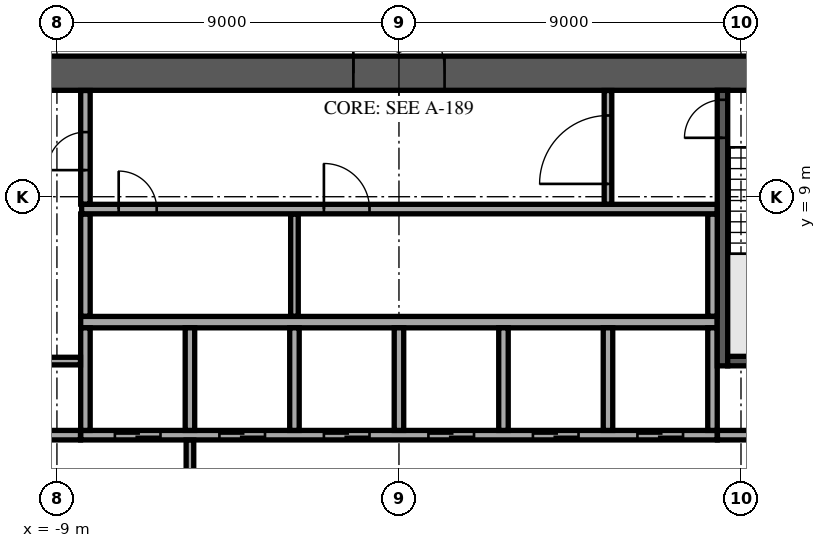
"""IFC4 building model, lengths in metres.
Left out: names, types, materials, properties, quantities, classifications, styles, units other than length and angle.
Written with IfcOpenShell. Run it as: python <this file> out.ifc"""

import sys

from ifc_helpers import new_model, si_unit, direction, frame, frame_2d, origin, place, context, subcontext, project, spatial, rectangle, extrude, element, fill, save


model = new_model("IFC4")
c1 = context("Model", 3, precision=1e-05, world=origin(), true_north=direction((0.0, 1.0)))
c2 = subcontext(c1, "Body", "Model", "MODEL_VIEW")
j1 = project(units=[si_unit("LENGTHUNIT", "METRE"), si_unit("PLANEANGLEUNIT", "RADIAN")], contexts=[c1])
p1 = place(None, origin())
s1 = spatial("IfcSite", under=j1, at=p1, CompositionType="ELEMENT")
p2 = place(p1, origin())
s2 = spatial("IfcBuilding", under=s1, at=p2, CompositionType="ELEMENT")
p3 = place(p2, frame((0.0, 0.0, 193.3)))
s3 = spatial("IfcBuildingStorey", under=s2, at=p3, CompositionType="ELEMENT", Elevation=193.3)
p4 = place(p3, frame((-12.7, 12.25, 0.0), z_axis=(0.0, 0.0, 1.0), x_axis=(1.0, 0.0, 0.0)))
e1 = element("IfcWall", 1, at=p4, inside=s3, PredefinedType="SHEAR", context=c2, shape_type="SweptSolid", body=[
    extrude(rectangle(XDim=25.4, YDim=0.9, at=frame_2d((12.7, 0.0))), origin(), (0.0, 0.0, 1.0), 3.62),
])
p5 = place(p4, frame((11.5, 0.0, 0.0)))
e2 = element("IfcOpeningElement", 2, at=p5, cuts=e1, PredefinedType="OPENING", context=c2, shape_type="SweptSolid", body=[
    extrude(rectangle(XDim=2.4, YDim=2.4, at=frame_2d((1.2, 1.2))), frame((0.0, 0.46, 0.0), z_axis=(0.0, -1.0, 0.0), x_axis=(1.0, 0.0, 0.0)), (0.0, 0.0, 1.0), 0.92),
])
p6 = place(p4, frame((22.325, 0.0, 0.0)))
e3 = element("IfcOpeningElement", 3, at=p6, cuts=e1, PredefinedType="OPENING", context=c2, shape_type="SweptSolid", body=[
    extrude(rectangle(XDim=1.2, YDim=2.1, at=frame_2d((0.6, 1.05))), frame((0.0, 0.46, 0.0), z_axis=(0.0, -1.0, 0.0), x_axis=(1.0, 0.0, 0.0)), (0.0, 0.0, 1.0), 0.92),
])
p7 = place(p4, frame((1.3, 0.0, 0.0)))
e4 = element("IfcOpeningElement", 4, at=p7, cuts=e1, PredefinedType="OPENING", context=c2, shape_type="SweptSolid", body=[
    extrude(rectangle(XDim=1.0, YDim=2.1, at=frame_2d((0.5, 1.05))), frame((0.0, 0.46, 0.0), z_axis=(0.0, -1.0, 0.0), x_axis=(1.0, 0.0, 0.0)), (0.0, 0.0, 1.0), 0.92),
])
p8 = place(p3, frame((-8.375, 5.7, 0.0), z_axis=(0.0, 0.0, 1.0), x_axis=(1.0, 0.0, 0.0)))
e5 = element("IfcWall", 5, at=p8, inside=s3, PredefinedType="SOLIDWALL", context=c2, shape_type="SweptSolid", body=[
    extrude(rectangle(XDim=16.75, YDim=0.3, at=frame_2d((8.375, 0.0))), origin(), (0.0, 0.0, 1.0), 3.62),
])
p9 = place(p3, frame((-8.375, 2.725, 0.0), z_axis=(0.0, 0.0, 1.0), x_axis=(1.0, 0.0, 0.0)))
e6 = element("IfcWall", 6, at=p9, inside=s3, PredefinedType="SOLIDWALL", context=c2, shape_type="SweptSolid", body=[
    extrude(rectangle(XDim=16.75, YDim=0.25, at=frame_2d((8.375, 0.0))), origin(), (0.0, 0.0, 1.0), 3.62),
])
p10 = place(p9, frame((0.9, 0.0, 0.0)))
e7 = element("IfcOpeningElement", 7, at=p10, cuts=e6, PredefinedType="OPENING", context=c2, shape_type="SweptSolid", body=[
    extrude(rectangle(XDim=1.2, YDim=2.1, at=frame_2d((0.6, 1.05))), frame((0.0, 0.135, 0.0), z_axis=(0.0, -1.0, 0.0), x_axis=(1.0, 0.0, 0.0)), (0.0, 0.0, 1.0), 0.27),
])
p11 = place(p9, frame((3.65, 0.0, 0.0)))
e8 = element("IfcOpeningElement", 8, at=p11, cuts=e6, PredefinedType="OPENING", context=c2, shape_type="SweptSolid", body=[
    extrude(rectangle(XDim=1.2, YDim=2.1, at=frame_2d((0.6, 1.05))), frame((0.0, 0.135, 0.0), z_axis=(0.0, -1.0, 0.0), x_axis=(1.0, 0.0, 0.0)), (0.0, 0.0, 1.0), 0.27),
])
p12 = place(p9, frame((6.4, 0.0, 0.0)))
e9 = element("IfcOpeningElement", 9, at=p12, cuts=e6, PredefinedType="OPENING", context=c2, shape_type="SweptSolid", body=[
    extrude(rectangle(XDim=1.2, YDim=2.1, at=frame_2d((0.6, 1.05))), frame((0.0, 0.135, 0.0), z_axis=(0.0, -1.0, 0.0), x_axis=(1.0, 0.0, 0.0)), (0.0, 0.0, 1.0), 0.27),
])
p13 = place(p9, frame((9.15, 0.0, 0.0)))
e10 = element("IfcOpeningElement", 10, at=p13, cuts=e6, PredefinedType="OPENING", context=c2, shape_type="SweptSolid", body=[
    extrude(rectangle(XDim=1.2, YDim=2.1, at=frame_2d((0.6, 1.05))), frame((0.0, 0.135, 0.0), z_axis=(0.0, -1.0, 0.0), x_axis=(1.0, 0.0, 0.0)), (0.0, 0.0, 1.0), 0.27),
])
p14 = place(p9, frame((11.9, 0.0, 0.0)))
e11 = element("IfcOpeningElement", 11, at=p14, cuts=e6, PredefinedType="OPENING", context=c2, shape_type="SweptSolid", body=[
    extrude(rectangle(XDim=1.2, YDim=2.1, at=frame_2d((0.6, 1.05))), frame((0.0, 0.135, 0.0), z_axis=(0.0, -1.0, 0.0), x_axis=(1.0, 0.0, 0.0)), (0.0, 0.0, 1.0), 0.27),
])
p15 = place(p9, frame((14.65, 0.0, 0.0)))
e12 = element("IfcOpeningElement", 12, at=p15, cuts=e6, PredefinedType="OPENING", context=c2, shape_type="SweptSolid", body=[
    extrude(rectangle(XDim=1.2, YDim=2.1, at=frame_2d((0.6, 1.05))), frame((0.0, 0.135, 0.0), z_axis=(0.0, -1.0, 0.0), x_axis=(1.0, 0.0, 0.0)), (0.0, 0.0, 1.0), 0.27),
])
for number, where, z_axis, x_axis in (
    (13, (-8.25, 2.85, 0.0), (0.0, 0.0, 1.0), (0.0, 1.0, 0.0)),
    (14, (-5.5, 2.85, 0.0), (0.0, 0.0, 1.0), (0.0, 1.0, 0.0)),
    (15, (-2.75, 2.85, 0.0), (0.0, 0.0, 1.0), (0.0, 1.0, 0.0)),
    (16, (0.0, 2.85, 0.0), (0.0, 0.0, 1.0), (0.0, 1.0, 0.0)),
    (17, (2.75, 2.85, 0.0), (0.0, 0.0, 1.0), (0.0, 1.0, 0.0)),
    (18, (5.5, 2.85, 0.0), (0.0, 0.0, 1.0), (0.0, 1.0, 0.0)),
    (19, (8.25, 2.85, 0.0), (0.0, 0.0, 1.0), (0.0, 1.0, 0.0)),
):
    element("IfcWall", number, at=place(p3, frame(where, z_axis=z_axis, x_axis=x_axis)), inside=s3, PredefinedType="SOLIDWALL", context=c2, shape_type="SweptSolid", body=[
        extrude(rectangle(XDim=2.7, YDim=0.25, at=frame_2d((1.35, 0.0))), origin(), (0.0, 0.0, 1.0), 3.62),
    ])
p16 = place(p3, frame((8.512, 4.55, 0.0), z_axis=(0.0, 0.0, 1.0), x_axis=(0.0, 1.0, 0.0)))
e20 = element("IfcWall", 20, at=p16, inside=s3, PredefinedType="SOLIDWALL", context=c2, shape_type="SweptSolid", body=[
    extrude(rectangle(XDim=7.25, YDim=0.275, at=frame_2d((3.625, 0.0))), origin(), (0.0, 0.0, 1.0), 3.62),
])
p17 = place(p16, frame((6.0, 0.0, 0.0)))
e21 = element("IfcOpeningElement", 21, at=p17, cuts=e20, PredefinedType="OPENING", context=c2, shape_type="SweptSolid", body=[
    extrude(rectangle(XDim=1.0, YDim=2.1, at=frame_2d((0.5, 1.05))), frame((0.0, 0.147, 0.0), z_axis=(0.0, -1.0, 0.0), x_axis=(1.0, 0.0, 0.0)), (0.0, 0.0, 1.0), 0.295),
])
p18 = place(p3, frame((8.65, 4.675, 0.0), z_axis=(0.0, 0.0, 1.0), x_axis=(1.0, 0.0, 0.0)))
e22 = element("IfcWall", 22, at=p18, inside=s3, PredefinedType="SOLIDWALL", context=c2, shape_type="SweptSolid", body=[
    extrude(rectangle(XDim=3.15, YDim=0.25, at=frame_2d((1.575, 0.0))), origin(), (0.0, 0.0, 1.0), 3.62),
])
p19 = place(p3, frame((-5.5, -2.595, 0.0), z_axis=(0.0, 0.0, 1.0), x_axis=(0.0, 1.0, 0.0)))
e23 = element("IfcWall", 23, at=p19, inside=s3, PredefinedType="PARTITIONING", context=c2, shape_type="SweptSolid", body=[
    extrude(rectangle(XDim=5.19, YDim=0.2, at=frame_2d((2.595, 0.0))), origin(), (0.0, 0.0, 1.0), 3.62),
])
p20 = place(p19, frame((1.395, 0.0, 0.0)))
e24 = element("IfcOpeningElement", 24, at=p20, cuts=e23, PredefinedType="OPENING", context=c2, shape_type="SweptSolid", body=[
    extrude(rectangle(XDim=2.4, YDim=2.4, at=frame_2d((1.2, 1.2))), frame((0.0, 0.11, 0.0), z_axis=(0.0, -1.0, 0.0), x_axis=(1.0, 0.0, 0.0)), (0.0, 0.0, 1.0), 0.22),
])
p21 = place(p3, frame((-11.795, 2.725, 0.0), z_axis=(0.0, 0.0, 1.0), x_axis=(1.0, 0.0, 0.0)))
e25 = element("IfcWall", 25, at=p21, inside=s3, PredefinedType="PARTITIONING", context=c2, shape_type="SweptSolid", body=[
    extrude(rectangle(XDim=3.415, YDim=0.25, at=frame_2d((1.708, 0.0))), origin(), (0.0, 0.0, 1.0), 3.62),
])
p22 = place(p21, frame((1.345, 0.0, 0.0)))
e26 = element("IfcOpeningElement", 26, at=p22, cuts=e25, PredefinedType="OPENING", context=c2, shape_type="SweptSolid", body=[
    extrude(rectangle(XDim=0.9, YDim=2.1, at=frame_2d((0.45, 1.05))), frame((0.0, 0.135, 0.0), z_axis=(0.0, -1.0, 0.0), x_axis=(1.0, 0.0, 0.0)), (0.0, 0.0, 1.0), 0.27),
])
p23 = place(p3, frame((8.38, 2.725, 0.0), z_axis=(0.0, 0.0, 1.0), x_axis=(1.0, 0.0, 0.0)))
e27 = element("IfcWall", 27, at=p23, inside=s3, PredefinedType="PARTITIONING", context=c2, shape_type="SweptSolid", body=[
    extrude(rectangle(XDim=3.415, YDim=0.25, at=frame_2d((1.708, 0.0))), origin(), (0.0, 0.0, 1.0), 3.62),
])
p24 = place(p23, frame((1.17, 0.0, 0.0)))
e28 = element("IfcOpeningElement", 28, at=p24, cuts=e27, PredefinedType="OPENING", context=c2, shape_type="SweptSolid", body=[
    extrude(rectangle(XDim=0.9, YDim=2.1, at=frame_2d((0.45, 1.05))), frame((0.0, 0.135, 0.0), z_axis=(0.0, -1.0, 0.0), x_axis=(1.0, 0.0, 0.0)), (0.0, 0.0, 1.0), 0.27),
])
p25 = place(p3, frame((-11.795, 4.675, 0.0), z_axis=(0.0, 0.0, 1.0), x_axis=(1.0, 0.0, 0.0)))
e29 = element("IfcWall", 29, at=p25, inside=s3, PredefinedType="PARTITIONING", context=c2, shape_type="SweptSolid", body=[
    extrude(rectangle(XDim=3.415, YDim=0.2, at=frame_2d((1.708, 0.0))), origin(), (0.0, 0.0, 1.0), 3.62),
])
p26 = place(p3, frame((-8.25, 5.855, 0.0), z_axis=(0.0, 0.0, 1.0), x_axis=(0.0, 1.0, 0.0)))
e30 = element("IfcWall", 30, at=p26, inside=s3, PredefinedType="PARTITIONING", context=c2, shape_type="SweptSolid", body=[
    extrude(rectangle(XDim=2.69, YDim=0.25, at=frame_2d((1.345, 0.0))), origin(), (0.0, 0.0, 1.0), 3.62),
])
p27 = place(p3, frame((-2.75, 5.855, 0.0), z_axis=(0.0, 0.0, 1.0), x_axis=(0.0, 1.0, 0.0)))
e31 = element("IfcWall", 31, at=p27, inside=s3, PredefinedType="PARTITIONING", context=c2, shape_type="SweptSolid", body=[
    extrude(rectangle(XDim=2.69, YDim=0.2, at=frame_2d((1.345, 0.0))), origin(), (0.0, 0.0, 1.0), 3.62),
])
p28 = place(p3, frame((8.25, 5.855, 0.0), z_axis=(0.0, 0.0, 1.0), x_axis=(0.0, 1.0, 0.0)))
e32 = element("IfcWall", 32, at=p28, inside=s3, PredefinedType="PARTITIONING", context=c2, shape_type="SweptSolid", body=[
    extrude(rectangle(XDim=2.69, YDim=0.25, at=frame_2d((1.345, 0.0))), origin(), (0.0, 0.0, 1.0), 3.62),
])
p29 = place(p3, frame((-8.35, 8.675, 0.0), z_axis=(0.0, 0.0, 1.0), x_axis=(1.0, 0.0, 0.0)))
e33 = element("IfcWall", 33, at=p29, inside=s3, PredefinedType="PARTITIONING", context=c2, shape_type="SweptSolid", body=[
    extrude(rectangle(XDim=16.72, YDim=0.25, at=frame_2d((8.36, 0.0))), origin(), (0.0, 0.0, 1.0), 3.62),
])
p30 = place(p29, frame((0.975, 0.0, 0.0)))
e34 = element("IfcOpeningElement", 34, at=p30, cuts=e33, PredefinedType="OPENING", context=c2, shape_type="SweptSolid", body=[
    extrude(rectangle(XDim=1.0, YDim=2.1, at=frame_2d((0.5, 1.05))), frame((0.0, 0.135, 0.0), z_axis=(0.0, -1.0, 0.0), x_axis=(1.0, 0.0, 0.0)), (0.0, 0.0, 1.0), 0.27),
])
p31 = place(p29, frame((6.375, 0.0, 0.0)))
e35 = element("IfcOpeningElement", 35, at=p31, cuts=e33, PredefinedType="OPENING", context=c2, shape_type="SweptSolid", body=[
    extrude(rectangle(XDim=1.2, YDim=2.1, at=frame_2d((0.6, 1.05))), frame((0.0, 0.135, 0.0), z_axis=(0.0, -1.0, 0.0), x_axis=(1.0, 0.0, 0.0)), (0.0, 0.0, 1.0), 0.27),
])
p32 = place(p3, frame((-8.25, 8.805, 0.0), z_axis=(0.0, 0.0, 1.0), x_axis=(0.0, 1.0, 0.0)))
e36 = element("IfcWall", 36, at=p32, inside=s3, PredefinedType="PARTITIONING", context=c2, shape_type="SweptSolid", body=[
    extrude(rectangle(XDim=2.99, YDim=0.25, at=frame_2d((1.495, 0.0))), origin(), (0.0, 0.0, 1.0), 3.62),
])
p33 = place(p32, frame((0.895, 0.0, 0.0)))
e37 = element("IfcOpeningElement", 37, at=p33, cuts=e36, PredefinedType="OPENING", context=c2, shape_type="SweptSolid", body=[
    extrude(rectangle(XDim=1.0, YDim=2.1, at=frame_2d((0.5, 1.05))), frame((0.0, 0.135, 0.0), z_axis=(0.0, -1.0, 0.0), x_axis=(1.0, 0.0, 0.0)), (0.0, 0.0, 1.0), 0.27),
])
p34 = place(p3, frame((5.5, 8.805, 0.0), z_axis=(0.0, 0.0, 1.0), x_axis=(0.0, 1.0, 0.0)))
e38 = element("IfcWall", 38, at=p34, inside=s3, PredefinedType="PARTITIONING", context=c2, shape_type="SweptSolid", body=[
    extrude(rectangle(XDim=2.99, YDim=0.2, at=frame_2d((1.495, 0.0))), origin(), (0.0, 0.0, 1.0), 3.62),
])
p35 = place(p34, frame((0.532, 0.0, 0.0)))
e39 = element("IfcOpeningElement", 39, at=p35, cuts=e38, PredefinedType="OPENING", context=c2, shape_type="SweptSolid", body=[
    extrude(rectangle(XDim=1.8, YDim=2.1, at=frame_2d((0.9, 1.05))), frame((0.0, 0.11, 0.0), z_axis=(0.0, -1.0, 0.0), x_axis=(1.0, 0.0, 0.0)), (0.0, 0.0, 1.0), 0.22),
])
p36 = place(p3, frame((2.286, 34.715, 0.0), z_axis=(0.0, 0.0, 1.0), x_axis=(-0.754708272811, -0.656060532993, 0.0)))
e40 = element("IfcWall", 40, at=p36, inside=s3, PredefinedType="STANDARD", context=c2, shape_type="SweptSolid", body=[
    extrude(rectangle(XDim=49.0, YDim=0.6, at=frame_2d((24.5, 0.0))), origin(), (0.0, 0.0, 1.0), 3.62),
])
p37 = place(p36, frame((1.227, 0.0, 0.9)))
e41 = element("IfcOpeningElement", 41, at=p37, cuts=e40, PredefinedType="OPENING", context=c2, shape_type="SweptSolid", body=[
    extrude(rectangle(XDim=2.0, YDim=2.1, at=frame_2d((1.0, 1.05))), frame((0.0, 0.31, 0.0), z_axis=(0.0, -1.0, 0.0), x_axis=(1.0, 0.0, 0.0)), (0.0, 0.0, 1.0), 0.62),
])
p38 = place(p36, frame((5.682, 0.0, 0.9)))
e42 = element("IfcOpeningElement", 42, at=p38, cuts=e40, PredefinedType="OPENING", context=c2, shape_type="SweptSolid", body=[
    extrude(rectangle(XDim=2.0, YDim=2.1, at=frame_2d((1.0, 1.05))), frame((0.0, 0.31, 0.0), z_axis=(0.0, -1.0, 0.0), x_axis=(1.0, 0.0, 0.0)), (0.0, 0.0, 1.0), 0.62),
])
p39 = place(p36, frame((10.136, 0.0, 0.9)))
e43 = element("IfcOpeningElement", 43, at=p39, cuts=e40, PredefinedType="OPENING", context=c2, shape_type="SweptSolid", body=[
    extrude(rectangle(XDim=2.0, YDim=2.1, at=frame_2d((1.0, 1.05))), frame((0.0, 0.31, 0.0), z_axis=(0.0, -1.0, 0.0), x_axis=(1.0, 0.0, 0.0)), (0.0, 0.0, 1.0), 0.62),
])
p40 = place(p36, frame((14.591, 0.0, 0.9)))
e44 = element("IfcOpeningElement", 44, at=p40, cuts=e40, PredefinedType="OPENING", context=c2, shape_type="SweptSolid", body=[
    extrude(rectangle(XDim=2.0, YDim=2.1, at=frame_2d((1.0, 1.05))), frame((0.0, 0.31, 0.0), z_axis=(0.0, -1.0, 0.0), x_axis=(1.0, 0.0, 0.0)), (0.0, 0.0, 1.0), 0.62),
])
p41 = place(p36, frame((19.045, 0.0, 0.9)))
e45 = element("IfcOpeningElement", 45, at=p41, cuts=e40, PredefinedType="OPENING", context=c2, shape_type="SweptSolid", body=[
    extrude(rectangle(XDim=2.0, YDim=2.1, at=frame_2d((1.0, 1.05))), frame((0.0, 0.31, 0.0), z_axis=(0.0, -1.0, 0.0), x_axis=(1.0, 0.0, 0.0)), (0.0, 0.0, 1.0), 0.62),
])
p42 = place(p36, frame((23.5, 0.0, 0.9)))
e46 = element("IfcOpeningElement", 46, at=p42, cuts=e40, PredefinedType="OPENING", context=c2, shape_type="SweptSolid", body=[
    extrude(rectangle(XDim=2.0, YDim=2.1, at=frame_2d((1.0, 1.05))), frame((0.0, 0.31, 0.0), z_axis=(0.0, -1.0, 0.0), x_axis=(1.0, 0.0, 0.0)), (0.0, 0.0, 1.0), 0.62),
])
p43 = place(p36, frame((27.955, 0.0, 0.9)))
e47 = element("IfcOpeningElement", 47, at=p43, cuts=e40, PredefinedType="OPENING", context=c2, shape_type="SweptSolid", body=[
    extrude(rectangle(XDim=2.0, YDim=2.1, at=frame_2d((1.0, 1.05))), frame((0.0, 0.31, 0.0), z_axis=(0.0, -1.0, 0.0), x_axis=(1.0, 0.0, 0.0)), (0.0, 0.0, 1.0), 0.62),
])
p44 = place(p36, frame((32.409, 0.0, 0.9)))
e48 = element("IfcOpeningElement", 48, at=p44, cuts=e40, PredefinedType="OPENING", context=c2, shape_type="SweptSolid", body=[
    extrude(rectangle(XDim=2.0, YDim=2.1, at=frame_2d((1.0, 1.05))), frame((0.0, 0.31, 0.0), z_axis=(0.0, -1.0, 0.0), x_axis=(1.0, 0.0, 0.0)), (0.0, 0.0, 1.0), 0.62),
])
p45 = place(p36, frame((36.864, 0.0, 0.9)))
e49 = element("IfcOpeningElement", 49, at=p45, cuts=e40, PredefinedType="OPENING", context=c2, shape_type="SweptSolid", body=[
    extrude(rectangle(XDim=2.0, YDim=2.1, at=frame_2d((1.0, 1.05))), frame((0.0, 0.31, 0.0), z_axis=(0.0, -1.0, 0.0), x_axis=(1.0, 0.0, 0.0)), (0.0, 0.0, 1.0), 0.62),
])
p46 = place(p36, frame((41.318, 0.0, 0.9)))
e50 = element("IfcOpeningElement", 50, at=p46, cuts=e40, PredefinedType="OPENING", context=c2, shape_type="SweptSolid", body=[
    extrude(rectangle(XDim=2.0, YDim=2.1, at=frame_2d((1.0, 1.05))), frame((0.0, 0.31, 0.0), z_axis=(0.0, -1.0, 0.0), x_axis=(1.0, 0.0, 0.0)), (0.0, 0.0, 1.0), 0.62),
])
p47 = place(p36, frame((45.773, 0.0, 0.9)))
e51 = element("IfcOpeningElement", 51, at=p47, cuts=e40, PredefinedType="OPENING", context=c2, shape_type="SweptSolid", body=[
    extrude(rectangle(XDim=2.0, YDim=2.1, at=frame_2d((1.0, 1.05))), frame((0.0, 0.31, 0.0), z_axis=(0.0, -1.0, 0.0), x_axis=(1.0, 0.0, 0.0)), (0.0, 0.0, 1.0), 0.62),
])
p48 = place(p3, frame((-26.208, 2.616, 0.0), z_axis=(0.0, 0.0, 1.0), x_axis=(0.754710701231, 0.656057739416, 0.0)))
e52 = element("IfcWall", 52, at=p48, inside=s3, PredefinedType="PARTITIONING", context=c2, shape_type="SweptSolid", body=[
    extrude(rectangle(XDim=36.126, YDim=0.15, at=frame_2d((18.063, 0.0))), origin(), (0.0, 0.0, 1.0), 3.17),
])
p49 = place(p48, frame((2.551, 0.0, 0.0)))
e53 = element("IfcOpeningElement", 53, at=p49, cuts=e52, PredefinedType="OPENING", context=c2, shape_type="SweptSolid", body=[
    extrude(rectangle(XDim=1.0, YDim=2.1, at=frame_2d((0.5, 1.05))), frame((0.0, 0.085, 0.0), z_axis=(0.0, -1.0, 0.0), x_axis=(1.0, 0.0, 0.0)), (0.0, 0.0, 1.0), 0.17),
])
p50 = place(p48, frame((15.362, 0.0, 0.0)))
e54 = element("IfcOpeningElement", 54, at=p50, cuts=e52, PredefinedType="OPENING", context=c2, shape_type="SweptSolid", body=[
    extrude(rectangle(XDim=1.0, YDim=2.1, at=frame_2d((0.5, 1.05))), frame((0.0, 0.085, 0.0), z_axis=(0.0, -1.0, 0.0), x_axis=(1.0, 0.0, 0.0)), (0.0, 0.0, 1.0), 0.17),
])
p51 = place(p48, frame((25.542, 0.0, 0.0)))
e55 = element("IfcOpeningElement", 55, at=p51, cuts=e52, PredefinedType="OPENING", context=c2, shape_type="SweptSolid", body=[
    extrude(rectangle(XDim=1.8, YDim=2.1, at=frame_2d((0.9, 1.05))), frame((0.0, 0.085, 0.0), z_axis=(0.0, -1.0, 0.0), x_axis=(1.0, 0.0, 0.0)), (0.0, 0.0, 1.0), 0.17),
])
p52 = place(p3, frame((8.103, 24.087, 0.0), z_axis=(0.0, 0.0, 1.0), x_axis=(0.656048444225, -0.754718781289, 0.0)))
e56 = element("IfcWall", 56, at=p52, inside=s3, PredefinedType="PARTITIONING", context=c2, shape_type="SweptSolid", body=[
    extrude(rectangle(XDim=25.8, YDim=0.15, at=frame_2d((12.9, 0.0))), origin(), (0.0, 0.0, 1.0), 3.17),
])
p53 = place(p5, origin())
e57 = element("IfcDoor", 57, at=p53, inside=s3, OperationType="SINGLE_SWING_LEFT", PredefinedType="DOOR", context=c2, shape_type="SweptSolid", body=[
    extrude(rectangle(XDim=2.4, YDim=2.4, at=frame_2d((1.2, 1.2))), frame((0.0, 0.025, 0.0), z_axis=(0.0, -1.0, 0.0), x_axis=(1.0, 0.0, 0.0)), (0.0, 0.0, 1.0), 0.05),
])
fill(e2, e57)
p54 = place(p10, origin())
e58 = element("IfcDoor", 58, at=p54, inside=s3, OperationType="DOUBLE_DOOR_SLIDING", PredefinedType="DOOR", context=c2, shape_type="SweptSolid", body=[
    extrude(rectangle(XDim=1.2, YDim=2.1, at=frame_2d((0.6, 1.05))), frame((0.0, 0.025, 0.0), z_axis=(0.0, -1.0, 0.0), x_axis=(1.0, 0.0, 0.0)), (0.0, 0.0, 1.0), 0.05),
])
fill(e7, e58)
p55 = place(p11, origin())
e59 = element("IfcDoor", 59, at=p55, inside=s3, OperationType="DOUBLE_DOOR_SLIDING", PredefinedType="DOOR", context=c2, shape_type="SweptSolid", body=[
    extrude(rectangle(XDim=1.2, YDim=2.1, at=frame_2d((0.6, 1.05))), frame((0.0, 0.025, 0.0), z_axis=(0.0, -1.0, 0.0), x_axis=(1.0, 0.0, 0.0)), (0.0, 0.0, 1.0), 0.05),
])
fill(e8, e59)
p56 = place(p12, origin())
e60 = element("IfcDoor", 60, at=p56, inside=s3, OperationType="DOUBLE_DOOR_SLIDING", PredefinedType="DOOR", context=c2, shape_type="SweptSolid", body=[
    extrude(rectangle(XDim=1.2, YDim=2.1, at=frame_2d((0.6, 1.05))), frame((0.0, 0.025, 0.0), z_axis=(0.0, -1.0, 0.0), x_axis=(1.0, 0.0, 0.0)), (0.0, 0.0, 1.0), 0.05),
])
fill(e9, e60)
p57 = place(p13, origin())
e61 = element("IfcDoor", 61, at=p57, inside=s3, OperationType="DOUBLE_DOOR_SLIDING", PredefinedType="DOOR", context=c2, shape_type="SweptSolid", body=[
    extrude(rectangle(XDim=1.2, YDim=2.1, at=frame_2d((0.6, 1.05))), frame((0.0, 0.025, 0.0), z_axis=(0.0, -1.0, 0.0), x_axis=(1.0, 0.0, 0.0)), (0.0, 0.0, 1.0), 0.05),
])
fill(e10, e61)
p58 = place(p14, origin())
e62 = element("IfcDoor", 62, at=p58, inside=s3, OperationType="DOUBLE_DOOR_SLIDING", PredefinedType="DOOR", context=c2, shape_type="SweptSolid", body=[
    extrude(rectangle(XDim=1.2, YDim=2.1, at=frame_2d((0.6, 1.05))), frame((0.0, 0.025, 0.0), z_axis=(0.0, -1.0, 0.0), x_axis=(1.0, 0.0, 0.0)), (0.0, 0.0, 1.0), 0.05),
])
fill(e11, e62)
p59 = place(p15, origin())
e63 = element("IfcDoor", 63, at=p59, inside=s3, OperationType="DOUBLE_DOOR_SLIDING", PredefinedType="DOOR", context=c2, shape_type="SweptSolid", body=[
    extrude(rectangle(XDim=1.2, YDim=2.1, at=frame_2d((0.6, 1.05))), frame((0.0, 0.025, 0.0), z_axis=(0.0, -1.0, 0.0), x_axis=(1.0, 0.0, 0.0)), (0.0, 0.0, 1.0), 0.05),
])
fill(e12, e63)
p60 = place(p17, origin())
e64 = element("IfcDoor", 64, at=p60, inside=s3, OperationType="SINGLE_SWING_LEFT", PredefinedType="DOOR", context=c2, shape_type="SweptSolid", body=[
    extrude(rectangle(XDim=1.0, YDim=2.1, at=frame_2d((0.5, 1.05))), frame((0.0, 0.025, 0.0), z_axis=(0.0, -1.0, 0.0), x_axis=(1.0, 0.0, 0.0)), (0.0, 0.0, 1.0), 0.05),
])
fill(e21, e64)
p61 = place(p33, origin())
e65 = element("IfcDoor", 65, at=p61, inside=s3, OperationType="SINGLE_SWING_RIGHT", PredefinedType="DOOR", context=c2, shape_type="SweptSolid", body=[
    extrude(rectangle(XDim=1.0, YDim=2.1, at=frame_2d((0.5, 1.05))), frame((0.0, 0.025, 0.0), z_axis=(0.0, -1.0, 0.0), x_axis=(1.0, 0.0, 0.0)), (0.0, 0.0, 1.0), 0.05),
])
fill(e37, e65)
p62 = place(p30, origin())
e66 = element("IfcDoor", 66, at=p62, inside=s3, OperationType="SINGLE_SWING_RIGHT", PredefinedType="DOOR", context=c2, shape_type="SweptSolid", body=[
    extrude(rectangle(XDim=1.0, YDim=2.1, at=frame_2d((0.5, 1.05))), frame((0.0, 0.025, 0.0), z_axis=(0.0, -1.0, 0.0), x_axis=(1.0, 0.0, 0.0)), (0.0, 0.0, 1.0), 0.05),
])
fill(e34, e66)
p63 = place(p31, origin())
e67 = element("IfcDoor", 67, at=p63, inside=s3, OperationType="SINGLE_SWING_LEFT", PredefinedType="DOOR", context=c2, shape_type="SweptSolid", body=[
    extrude(rectangle(XDim=1.2, YDim=2.1, at=frame_2d((0.6, 1.05))), frame((0.0, 0.025, 0.0), z_axis=(0.0, -1.0, 0.0), x_axis=(1.0, 0.0, 0.0)), (0.0, 0.0, 1.0), 0.05),
])
fill(e35, e67)
p64 = place(p35, origin())
e68 = element("IfcDoor", 68, at=p64, inside=s3, OperationType="SINGLE_SWING_LEFT", PredefinedType="DOOR", context=c2, shape_type="SweptSolid", body=[
    extrude(rectangle(XDim=1.8, YDim=2.1, at=frame_2d((0.9, 1.05))), frame((0.0, 0.025, 0.0), z_axis=(0.0, -1.0, 0.0), x_axis=(1.0, 0.0, 0.0)), (0.0, 0.0, 1.0), 0.05),
])
fill(e39, e68)
save(model, sys.argv[1])
